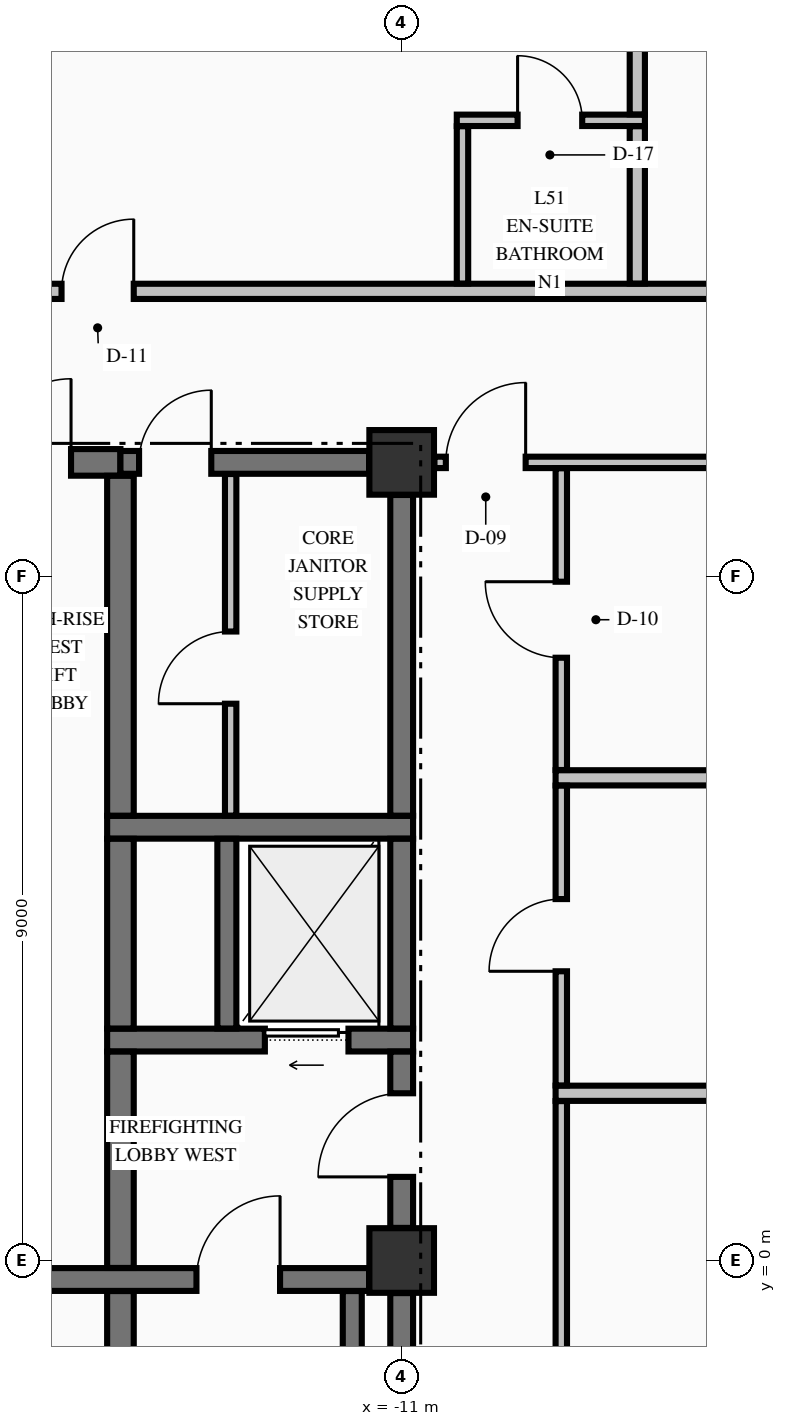
"""IFC4 building model, lengths in metres.
Left out: names, types, materials, properties, quantities, classifications, styles, units other than length and angle.
Written with IfcOpenShell. Run it as: python <this file> out.ifc"""

import sys

from ifc_helpers import new_model, si_unit, direction, frame, frame_2d, origin, origin_2d, place, context, subcontext, project, spatial, rectangle, extrude, element, fill, save


model = new_model("IFC4")
c1 = context("Model", 3, precision=1e-05, world=origin(), true_north=direction((0.0, 1.0)))
c2 = subcontext(c1, "Body", "Model", "MODEL_VIEW")
j1 = project(units=[si_unit("LENGTHUNIT", "METRE"), si_unit("PLANEANGLEUNIT", "RADIAN")], contexts=[c1])
p1 = place(None, origin())
s1 = spatial("IfcSite", under=j1, at=p1, CompositionType="ELEMENT")
p2 = place(p1, origin())
s2 = spatial("IfcBuilding", under=s1, at=p2, CompositionType="ELEMENT")
p3 = place(p2, frame((0.0, 0.0, 198.26)))
s3 = spatial("IfcBuildingStorey", under=s2, at=p3, CompositionType="ELEMENT", Elevation=198.26)
for number, where, z_axis, x_axis in (
    (1, (-11.0, 0.0, -0.25), (0.0, 0.0, 1.0), (1.0, 0.0, 0.0)),
    (2, (-11.0, 10.5, -0.25), (0.0, 0.0, 1.0), (1.0, 0.0, 0.0)),
):
    element("IfcColumn", number, at=place(p3, frame(where, z_axis=z_axis, x_axis=x_axis)), inside=s3, PredefinedType="COLUMN", context=c2, shape_type="SweptSolid", body=[
        extrude(rectangle(XDim=0.85, YDim=0.85, at=origin_2d()), origin(), (0.0, 0.0, 1.0), 3.4),
    ])
p4 = place(p3, frame((-19.571, -0.25, 0.0), z_axis=(0.0, 0.0, 1.0), x_axis=(1.0, 0.0, 0.0)))
e3 = element("IfcWall", 3, at=p4, inside=s3, PredefinedType="SHEAR", context=c2, shape_type="SweptSolid", body=[
    extrude(rectangle(XDim=8.142, YDim=0.3, at=frame_2d((4.071, 0.0))), origin(), (0.0, 0.0, 1.0), 3.15),
])
p5 = place(p4, frame((5.871, 0.0, 0.0)))
e4 = element("IfcOpeningElement", 4, at=p5, cuts=e3, PredefinedType="OPENING", context=c2, shape_type="SweptSolid", body=[
    extrude(rectangle(XDim=1.1, YDim=2.15, at=frame_2d((0.55, 1.075))), frame((0.0, 0.16, 0.0), z_axis=(0.0, -1.0, 0.0), x_axis=(1.0, 0.0, 0.0)), (0.0, 0.0, 1.0), 0.32),
])
p6 = place(p3, frame((-14.875, 2.9, 0.0), z_axis=(0.0, 0.0, 1.0), x_axis=(1.0, 0.0, 0.0)))
e5 = element("IfcWall", 5, at=p6, inside=s3, PredefinedType="SHEAR", context=c2, shape_type="SweptSolid", body=[
    extrude(rectangle(XDim=4.025, YDim=0.3, at=frame_2d((2.012, 0.0))), origin(), (0.0, 0.0, 1.0), 3.15),
])
p7 = place(p6, frame((2.075, 0.0, 0.0)))
e6 = element("IfcOpeningElement", 6, at=p7, cuts=e5, PredefinedType="OPENING", context=c2, shape_type="SweptSolid", body=[
    extrude(rectangle(XDim=1.1, YDim=2.2, at=frame_2d((0.55, 1.1))), frame((0.0, 0.16, 0.0), z_axis=(0.0, -1.0, 0.0), x_axis=(1.0, 0.0, 0.0)), (0.0, 0.0, 1.0), 0.32),
])
p8 = place(p3, frame((-14.875, 5.7, 0.0), z_axis=(0.0, 0.0, 1.0), x_axis=(1.0, 0.0, 0.0)))
e7 = element("IfcWall", 7, at=p8, inside=s3, PredefinedType="SHEAR", context=c2, shape_type="SweptSolid", body=[
    extrude(rectangle(XDim=4.025, YDim=0.3, at=frame_2d((2.012, 0.0))), origin(), (0.0, 0.0, 1.0), 3.15),
])
p9 = place(p3, frame((-19.571, 10.5, 0.0), z_axis=(0.0, 0.0, 1.0), x_axis=(1.0, 0.0, 0.0)))
e8 = element("IfcWall", 8, at=p9, inside=s3, PredefinedType="SHEAR", context=c2, shape_type="SweptSolid", body=[
    extrude(rectangle(XDim=4.871, YDim=0.35, at=frame_2d((2.436, 0.0))), origin(), (0.0, 0.0, 1.0), 3.15),
])
p10 = place(p9, frame((3.121, 0.0, 0.0)))
e9 = element("IfcOpeningElement", 9, at=p10, cuts=e8, PredefinedType="OPENING", context=c2, shape_type="SweptSolid", body=[
    extrude(rectangle(XDim=1.1, YDim=2.15, at=frame_2d((0.55, 1.075))), frame((0.0, 0.185, 0.0), z_axis=(0.0, -1.0, 0.0), x_axis=(1.0, 0.0, 0.0)), (0.0, 0.0, 1.0), 0.37),
])
p11 = place(p3, frame((-14.7, 10.5, 0.0), z_axis=(0.0, 0.0, 1.0), x_axis=(1.0, 0.0, 0.0)))
e10 = element("IfcWall", 10, at=p11, inside=s3, PredefinedType="SHEAR", context=c2, shape_type="SweptSolid", body=[
    extrude(rectangle(XDim=3.271, YDim=0.3, at=frame_2d((1.635, 0.0))), origin(), (0.0, 0.0, 1.0), 3.15),
])
p12 = place(p11, frame((0.245, 0.0, 0.0)))
e11 = element("IfcOpeningElement", 11, at=p12, cuts=e10, PredefinedType="OPENING", context=c2, shape_type="SweptSolid", body=[
    extrude(rectangle(XDim=0.95, YDim=2.15, at=frame_2d((0.475, 1.075))), frame((0.0, 0.16, 0.0), z_axis=(0.0, -1.0, 0.0), x_axis=(1.0, 0.0, 0.0)), (0.0, 0.0, 1.0), 0.32),
])
for number, where, z_axis, x_axis in (
    (12, (-8.975, 2.2, 0.0), (0.0, 0.0, 1.0), (1.0, 0.0, 0.0)),
    (13, (-8.975, 6.35, 0.0), (0.0, 0.0, 1.0), (1.0, 0.0, 0.0)),
):
    element("IfcWall", number, at=place(p3, frame(where, z_axis=z_axis, x_axis=x_axis)), inside=s3, PredefinedType="PARTITIONING", context=c2, shape_type="SweptSolid", body=[
        extrude(rectangle(XDim=10.875, YDim=0.2, at=frame_2d((5.438, 0.0))), origin(), (0.0, 0.0, 1.0), 3.15),
    ])
p13 = place(p3, frame((-10.569, 10.5, 0.0), z_axis=(0.0, 0.0, 1.0), x_axis=(1.0, 0.0, 0.0)))
e14 = element("IfcWall", 14, at=p13, inside=s3, PredefinedType="PARTITIONING", context=c2, shape_type="SweptSolid", body=[
    extrude(rectangle(XDim=21.138, YDim=0.15, at=frame_2d((10.569, 0.0))), origin(), (0.0, 0.0, 1.0), 3.15),
])
p14 = place(p13, frame((0.15, 0.0, 0.0)))
e15 = element("IfcOpeningElement", 15, at=p14, cuts=e14, PredefinedType="OPENING", context=c2, shape_type="SweptSolid", body=[
    extrude(rectangle(XDim=1.05, YDim=2.15, at=frame_2d((0.525, 1.075))), frame((0.0, 0.085, 0.0), z_axis=(0.0, -1.0, 0.0), x_axis=(1.0, 0.0, 0.0)), (0.0, 0.0, 1.0), 0.17),
])
p15 = place(p13, frame((19.938, 0.0, 0.0)))
e16 = element("IfcOpeningElement", 16, at=p15, cuts=e14, PredefinedType="OPENING", context=c2, shape_type="SweptSolid", body=[
    extrude(rectangle(XDim=1.05, YDim=2.15, at=frame_2d((0.525, 1.075))), frame((0.0, 0.085, 0.0), z_axis=(0.0, -1.0, 0.0), x_axis=(1.0, 0.0, 0.0)), (0.0, 0.0, 1.0), 0.17),
])
p16 = place(p3, frame((-22.1, 12.75, 0.0), z_axis=(0.0, 0.0, 1.0), x_axis=(1.0, 0.0, 0.0)))
e17 = element("IfcWall", 17, at=p16, inside=s3, PredefinedType="PARTITIONING", context=c2, shape_type="SweptSolid", body=[
    extrude(rectangle(XDim=39.2, YDim=0.2, at=frame_2d((19.6, 0.0))), origin(), (0.0, 0.0, 1.0), 3.15),
])
p17 = place(p16, frame((6.625, 0.0, 0.0)))
e18 = element("IfcOpeningElement", 18, at=p17, cuts=e17, PredefinedType="OPENING", context=c2, shape_type="SweptSolid", body=[
    extrude(rectangle(XDim=0.95, YDim=2.15, at=frame_2d((0.475, 1.075))), frame((0.0, 0.11, 0.0), z_axis=(0.0, -1.0, 0.0), x_axis=(1.0, 0.0, 0.0)), (0.0, 0.0, 1.0), 0.22),
])
p18 = place(p16, frame((18.075, 0.0, 0.0)))
e19 = element("IfcOpeningElement", 19, at=p18, cuts=e17, PredefinedType="OPENING", context=c2, shape_type="SweptSolid", body=[
    extrude(rectangle(XDim=0.95, YDim=2.15, at=frame_2d((0.475, 1.075))), frame((0.0, 0.11, 0.0), z_axis=(0.0, -1.0, 0.0), x_axis=(1.0, 0.0, 0.0)), (0.0, 0.0, 1.0), 0.22),
])
p19 = place(p16, frame((30.525, 0.0, 0.0)))
e20 = element("IfcOpeningElement", 20, at=p19, cuts=e17, PredefinedType="OPENING", context=c2, shape_type="SweptSolid", body=[
    extrude(rectangle(XDim=0.95, YDim=2.15, at=frame_2d((0.475, 1.075))), frame((0.0, 0.11, 0.0), z_axis=(0.0, -1.0, 0.0), x_axis=(1.0, 0.0, 0.0)), (0.0, 0.0, 1.0), 0.22),
])
p20 = place(p3, frame((-10.275, 15.0, 0.0), z_axis=(0.0, 0.0, 1.0), x_axis=(1.0, 0.0, 0.0)))
e21 = element("IfcWall", 21, at=p20, inside=s3, PredefinedType="PARTITIONING", context=c2, shape_type="SweptSolid", body=[
    extrude(rectangle(XDim=2.475, YDim=0.15, at=frame_2d((1.237, 0.0))), origin(), (0.0, 0.0, 1.0), 3.15),
])
p21 = place(p20, frame((0.8, 0.0, 0.0)))
e22 = element("IfcOpeningElement", 22, at=p21, cuts=e21, PredefinedType="OPENING", context=c2, shape_type="SweptSolid", body=[
    extrude(rectangle(XDim=0.85, YDim=2.1, at=frame_2d((0.425, 1.05))), frame((0.0, 0.085, 0.0), z_axis=(0.0, -1.0, 0.0), x_axis=(1.0, 0.0, 0.0)), (0.0, 0.0, 1.0), 0.17),
])
p22 = place(p3, frame((-14.7, -9.773, 0.0), z_axis=(0.0, 0.0, 1.0), x_axis=(0.0, 1.0, 0.0)))
e23 = element("IfcWall", 23, at=p22, inside=s3, PredefinedType="SHEAR", context=c2, shape_type="SweptSolid", body=[
    extrude(rectangle(XDim=9.371, YDim=0.35, at=frame_2d((4.686, 0.0))), origin(), (0.0, 0.0, 1.0), 3.15),
])
p23 = place(p3, frame((-14.7, -0.098, 0.0), z_axis=(0.0, 0.0, 1.0), x_axis=(0.0, 1.0, 0.0)))
e24 = element("IfcWall", 24, at=p23, inside=s3, PredefinedType="SHEAR", context=c2, shape_type="SweptSolid", body=[
    extrude(rectangle(XDim=2.846, YDim=0.35, at=frame_2d((1.423, 0.0))), origin(), (0.0, 0.0, 1.0), 3.15),
])
p24 = place(p3, frame((-14.7, 3.052, 0.0), z_axis=(0.0, 0.0, 1.0), x_axis=(0.0, 1.0, 0.0)))
e25 = element("IfcWall", 25, at=p24, inside=s3, PredefinedType="SHEAR", context=c2, shape_type="SweptSolid", body=[
    extrude(rectangle(XDim=2.496, YDim=0.35, at=frame_2d((1.248, 0.0))), origin(), (0.0, 0.0, 1.0), 3.15),
])
p25 = place(p3, frame((-14.7, 5.852, 0.0), z_axis=(0.0, 0.0, 1.0), x_axis=(0.0, 1.0, 0.0)))
e26 = element("IfcWall", 26, at=p25, inside=s3, PredefinedType="SHEAR", context=c2, shape_type="SweptSolid", body=[
    extrude(rectangle(XDim=4.471, YDim=0.35, at=frame_2d((2.235, 0.0))), origin(), (0.0, 0.0, 1.0), 3.15),
])
p26 = place(p3, frame((-13.3, 3.052, 0.0), z_axis=(0.0, 0.0, 1.0), x_axis=(0.0, 1.0, 0.0)))
e27 = element("IfcWall", 27, at=p26, inside=s3, PredefinedType="SOLIDWALL", context=c2, shape_type="SweptSolid", body=[
    extrude(rectangle(XDim=2.496, YDim=0.25, at=frame_2d((1.248, 0.0))), origin(), (0.0, 0.0, 1.0), 3.15),
])
p27 = place(p3, frame((-11.65, -9.798, 0.0), z_axis=(0.0, 0.0, 1.0), x_axis=(0.0, 1.0, 0.0)))
e28 = element("IfcWall", 28, at=p27, inside=s3, PredefinedType="SOLIDWALL", context=c2, shape_type="SweptSolid", body=[
    extrude(rectangle(XDim=9.396, YDim=0.25, at=frame_2d((4.698, 0.0))), origin(), (0.0, 0.0, 1.0), 3.15),
])
p28 = place(p3, frame((-11.0, -9.521, 0.0), z_axis=(0.0, 0.0, 1.0), x_axis=(0.0, 1.0, 0.0)))
e29 = element("IfcWall", 29, at=p28, inside=s3, PredefinedType="SHEAR", context=c2, shape_type="SweptSolid", body=[
    extrude(rectangle(XDim=9.092, YDim=0.3, at=frame_2d((4.546, 0.0))), origin(), (0.0, 0.0, 1.0), 3.15),
])
p29 = place(p3, frame((-11.0, 0.429, 0.0), z_axis=(0.0, 0.0, 1.0), x_axis=(0.0, 1.0, 0.0)))
e30 = element("IfcWall", 30, at=p29, inside=s3, PredefinedType="SHEAR", context=c2, shape_type="SweptSolid", body=[
    extrude(rectangle(XDim=2.319, YDim=0.3, at=frame_2d((1.16, 0.0))), origin(), (0.0, 0.0, 1.0), 3.15),
])
p30 = place(p29, frame((0.671, 0.0, 0.0)))
e31 = element("IfcOpeningElement", 31, at=p30, cuts=e30, PredefinedType="OPENING", context=c2, shape_type="SweptSolid", body=[
    extrude(rectangle(XDim=1.1, YDim=2.15, at=frame_2d((0.55, 1.075))), frame((0.0, 0.16, 0.0), z_axis=(0.0, -1.0, 0.0), x_axis=(1.0, 0.0, 0.0)), (0.0, 0.0, 1.0), 0.32),
])
p31 = place(p3, frame((-11.0, 3.052, 0.0), z_axis=(0.0, 0.0, 1.0), x_axis=(0.0, 1.0, 0.0)))
e32 = element("IfcWall", 32, at=p31, inside=s3, PredefinedType="SHEAR", context=c2, shape_type="SweptSolid", body=[
    extrude(rectangle(XDim=2.496, YDim=0.3, at=frame_2d((1.248, 0.0))), origin(), (0.0, 0.0, 1.0), 3.15),
])
p32 = place(p3, frame((-11.0, 5.852, 0.0), z_axis=(0.0, 0.0, 1.0), x_axis=(0.0, 1.0, 0.0)))
e33 = element("IfcWall", 33, at=p32, inside=s3, PredefinedType="SHEAR", context=c2, shape_type="SweptSolid", body=[
    extrude(rectangle(XDim=4.219, YDim=0.3, at=frame_2d((2.109, 0.0))), origin(), (0.0, 0.0, 1.0), 3.15),
])
p33 = place(p3, frame((-13.25, 5.853, 0.0), z_axis=(0.0, 0.0, 1.0), x_axis=(0.0, 1.0, 0.0)))
e34 = element("IfcWall", 34, at=p33, inside=s3, PredefinedType="PARTITIONING", context=c2, shape_type="SweptSolid", body=[
    extrude(rectangle(XDim=4.494, YDim=0.15, at=frame_2d((2.247, 0.0))), origin(), (0.0, 0.0, 1.0), 3.15),
])
p34 = place(p33, frame((1.472, 0.0, 0.0)))
e35 = element("IfcOpeningElement", 35, at=p34, cuts=e34, PredefinedType="OPENING", context=c2, shape_type="SweptSolid", body=[
    extrude(rectangle(XDim=0.95, YDim=2.15, at=frame_2d((0.475, 1.075))), frame((0.0, 0.085, 0.0), z_axis=(0.0, -1.0, 0.0), x_axis=(1.0, 0.0, 0.0)), (0.0, 0.0, 1.0), 0.17),
])
p35 = place(p3, frame((-10.2, 12.853, 0.0), z_axis=(0.0, 0.0, 1.0), x_axis=(0.0, 1.0, 0.0)))
e36 = element("IfcWall", 36, at=p35, inside=s3, PredefinedType="PARTITIONING", context=c2, shape_type="SweptSolid", body=[
    extrude(rectangle(XDim=2.069, YDim=0.15, at=frame_2d((1.035, 0.0))), origin(), (0.0, 0.0, 1.0), 3.15),
])
p36 = place(p3, frame((-8.9, -9.872, 0.0), z_axis=(0.0, 0.0, 1.0), x_axis=(0.0, 1.0, 0.0)))
e37 = element("IfcWall", 37, at=p36, inside=s3, PredefinedType="PARTITIONING", context=c2, shape_type="SweptSolid", body=[
    extrude(rectangle(XDim=11.969, YDim=0.15, at=frame_2d((5.984, 0.0))), origin(), (0.0, 0.0, 1.0), 3.15),
])
p37 = place(p36, frame((5.502, 0.0, 0.0)))
e38 = element("IfcOpeningElement", 38, at=p37, cuts=e37, PredefinedType="OPENING", context=c2, shape_type="SweptSolid", body=[
    extrude(rectangle(XDim=1.0, YDim=2.15, at=frame_2d((0.5, 1.075))), frame((0.0, 0.085, 0.0), z_axis=(0.0, -1.0, 0.0), x_axis=(1.0, 0.0, 0.0)), (0.0, 0.0, 1.0), 0.17),
])
p38 = place(p3, frame((-8.9, 2.303, 0.0), z_axis=(0.0, 0.0, 1.0), x_axis=(0.0, 1.0, 0.0)))
e39 = element("IfcWall", 39, at=p38, inside=s3, PredefinedType="PARTITIONING", context=c2, shape_type="SweptSolid", body=[
    extrude(rectangle(XDim=3.944, YDim=0.15, at=frame_2d((1.972, 0.0))), origin(), (0.0, 0.0, 1.0), 3.15),
])
p39 = place(p38, frame((1.502, 0.0, 0.0)))
e40 = element("IfcOpeningElement", 40, at=p39, cuts=e39, PredefinedType="OPENING", context=c2, shape_type="SweptSolid", body=[
    extrude(rectangle(XDim=0.95, YDim=2.15, at=frame_2d((0.475, 1.075))), frame((0.0, 0.085, 0.0), z_axis=(0.0, -1.0, 0.0), x_axis=(1.0, 0.0, 0.0)), (0.0, 0.0, 1.0), 0.17),
])
p40 = place(p3, frame((-8.9, 6.453, 0.0), z_axis=(0.0, 0.0, 1.0), x_axis=(0.0, 1.0, 0.0)))
e41 = element("IfcWall", 41, at=p40, inside=s3, PredefinedType="PARTITIONING", context=c2, shape_type="SweptSolid", body=[
    extrude(rectangle(XDim=3.969, YDim=0.15, at=frame_2d((1.985, 0.0))), origin(), (0.0, 0.0, 1.0), 3.15),
])
p41 = place(p40, frame((1.477, 0.0, 0.0)))
e42 = element("IfcOpeningElement", 42, at=p41, cuts=e41, PredefinedType="OPENING", context=c2, shape_type="SweptSolid", body=[
    extrude(rectangle(XDim=1.0, YDim=2.15, at=frame_2d((0.5, 1.075))), frame((0.0, 0.085, 0.0), z_axis=(0.0, -1.0, 0.0), x_axis=(1.0, 0.0, 0.0)), (0.0, 0.0, 1.0), 0.17),
])
p42 = place(p3, frame((-7.9, 12.853, 0.0), z_axis=(0.0, 0.0, 1.0), x_axis=(0.0, 1.0, 0.0)))
e43 = element("IfcWall", 43, at=p42, inside=s3, PredefinedType="PARTITIONING", context=c2, shape_type="SweptSolid", body=[
    extrude(rectangle(XDim=2.069, YDim=0.2, at=frame_2d((1.035, 0.0))), origin(), (0.0, 0.0, 1.0), 3.15),
])
p43 = place(p3, frame((-7.9, 15.078, 0.0), z_axis=(0.0, 0.0, 1.0), x_axis=(0.0, 1.0, 0.0)))
e44 = element("IfcWall", 44, at=p43, inside=s3, PredefinedType="PARTITIONING", context=c2, shape_type="SweptSolid", body=[
    extrude(rectangle(XDim=9.257, YDim=0.2, at=frame_2d((4.628, 0.0))), origin(), (0.0, 0.0, 1.0), 3.15),
])
p44 = place(p5, origin())
e45 = element("IfcDoor", 45, at=p44, inside=s3, OperationType="SINGLE_SWING_RIGHT", PredefinedType="DOOR", context=c2, shape_type="SweptSolid", body=[
    extrude(rectangle(XDim=1.1, YDim=2.15, at=frame_2d((0.55, 1.075))), frame((0.0, 0.025, 0.0), z_axis=(0.0, -1.0, 0.0), x_axis=(1.0, 0.0, 0.0)), (0.0, 0.0, 1.0), 0.05),
])
fill(e4, e45)
p45 = place(p30, origin())
e46 = element("IfcDoor", 46, at=p45, inside=s3, OperationType="SINGLE_SWING_LEFT", PredefinedType="DOOR", context=c2, shape_type="SweptSolid", body=[
    extrude(rectangle(XDim=1.1, YDim=2.15, at=frame_2d((0.55, 1.075))), frame((0.0, 0.025, 0.0), z_axis=(0.0, -1.0, 0.0), x_axis=(1.0, 0.0, 0.0)), (0.0, 0.0, 1.0), 0.05),
])
fill(e31, e46)
p46 = place(p7, origin())
e47 = element("IfcDoor", 47, at=p46, inside=s3, OperationType="SLIDING_TO_LEFT", PredefinedType="DOOR", context=c2, shape_type="SweptSolid", body=[
    extrude(rectangle(XDim=1.1, YDim=2.2, at=frame_2d((0.55, 1.1))), frame((0.0, 0.025, 0.0), z_axis=(0.0, -1.0, 0.0), x_axis=(1.0, 0.0, 0.0)), (0.0, 0.0, 1.0), 0.05),
])
fill(e6, e47)
p47 = place(p12, origin())
e48 = element("IfcDoor", 48, at=p47, inside=s3, OperationType="SINGLE_SWING_RIGHT", PredefinedType="DOOR", context=c2, shape_type="SweptSolid", body=[
    extrude(rectangle(XDim=0.95, YDim=2.15, at=frame_2d((0.475, 1.075))), frame((0.0, 0.025, 0.0), z_axis=(0.0, -1.0, 0.0), x_axis=(1.0, 0.0, 0.0)), (0.0, 0.0, 1.0), 0.05),
])
fill(e11, e48)
p48 = place(p34, origin())
e49 = element("IfcDoor", 49, at=p48, inside=s3, OperationType="SINGLE_SWING_LEFT", PredefinedType="DOOR", context=c2, shape_type="SweptSolid", body=[
    extrude(rectangle(XDim=0.95, YDim=2.15, at=frame_2d((0.475, 1.075))), frame((0.0, 0.025, 0.0), z_axis=(0.0, -1.0, 0.0), x_axis=(1.0, 0.0, 0.0)), (0.0, 0.0, 1.0), 0.05),
])
fill(e35, e49)
p49 = place(p10, origin())
e50 = element("IfcDoor", 50, at=p49, inside=s3, OperationType="SINGLE_SWING_RIGHT", PredefinedType="DOOR", context=c2, shape_type="SweptSolid", body=[
    extrude(rectangle(XDim=1.1, YDim=2.15, at=frame_2d((0.55, 1.075))), frame((0.0, 0.025, 0.0), z_axis=(0.0, -1.0, 0.0), x_axis=(1.0, 0.0, 0.0)), (0.0, 0.0, 1.0), 0.05),
])
fill(e9, e50)
p50 = place(p14, origin())
e51 = element("IfcDoor", 51, at=p50, inside=s3, OperationType="SINGLE_SWING_RIGHT", PredefinedType="DOOR", context=c2, shape_type="SweptSolid", body=[
    extrude(rectangle(XDim=1.05, YDim=2.15, at=frame_2d((0.525, 1.075))), frame((0.0, 0.025, 0.0), z_axis=(0.0, -1.0, 0.0), x_axis=(1.0, 0.0, 0.0)), (0.0, 0.0, 1.0), 0.05),
])
fill(e15, e51)
p51 = place(p17, origin())
e52 = element("IfcDoor", 52, at=p51, inside=s3, OperationType="SINGLE_SWING_RIGHT", PredefinedType="DOOR", context=c2, shape_type="SweptSolid", body=[
    extrude(rectangle(XDim=0.95, YDim=2.15, at=frame_2d((0.475, 1.075))), frame((0.0, 0.025, 0.0), z_axis=(0.0, -1.0, 0.0), x_axis=(1.0, 0.0, 0.0)), (0.0, 0.0, 1.0), 0.05),
])
fill(e18, e52)
p52 = place(p21, origin())
e53 = element("IfcDoor", 53, at=p52, inside=s3, OperationType="SINGLE_SWING_LEFT", PredefinedType="DOOR", context=c2, shape_type="SweptSolid", body=[
    extrude(rectangle(XDim=0.85, YDim=2.1, at=frame_2d((0.425, 1.05))), frame((0.0, 0.025, 0.0), z_axis=(0.0, -1.0, 0.0), x_axis=(1.0, 0.0, 0.0)), (0.0, 0.0, 1.0), 0.05),
])
fill(e22, e53)
p53 = place(p41, origin())
e54 = element("IfcDoor", 54, at=p53, inside=s3, OperationType="SINGLE_SWING_RIGHT", PredefinedType="DOOR", context=c2, shape_type="SweptSolid", body=[
    extrude(rectangle(XDim=1.0, YDim=2.15, at=frame_2d((0.5, 1.075))), frame((0.0, 0.025, 0.0), z_axis=(0.0, -1.0, 0.0), x_axis=(1.0, 0.0, 0.0)), (0.0, 0.0, 1.0), 0.05),
])
fill(e42, e54)
p54 = place(p39, origin())
e55 = element("IfcDoor", 55, at=p54, inside=s3, OperationType="SINGLE_SWING_LEFT", PredefinedType="DOOR", context=c2, shape_type="SweptSolid", body=[
    extrude(rectangle(XDim=0.95, YDim=2.15, at=frame_2d((0.475, 1.075))), frame((0.0, 0.025, 0.0), z_axis=(0.0, -1.0, 0.0), x_axis=(1.0, 0.0, 0.0)), (0.0, 0.0, 1.0), 0.05),
])
fill(e40, e55)
save(model, sys.argv[1])
